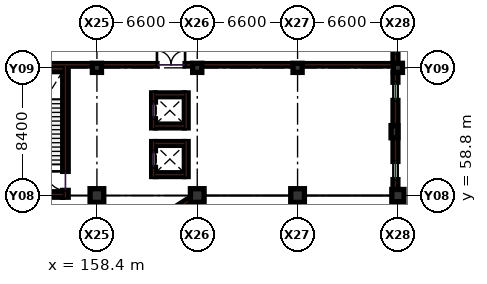
"""IFC4 building model, lengths in metres.
Left out: names, types, materials, properties, quantities, classifications, styles, units other than length and angle.
Written with IfcOpenShell. Run it as: python <this file> out.ifc"""

import sys

from ifc_helpers import new_model, si_unit, direction, frame, frame_2d, origin, origin_2d, place, context, subcontext, project, spatial, rectangle, extrude, element, fill, save


model = new_model("IFC4")
c1 = context("Model", 3, precision=1e-05, world=origin(), true_north=direction((0.0, 1.0)))
c2 = subcontext(c1, "Body", "Model", "MODEL_VIEW")
j1 = project(units=[si_unit("LENGTHUNIT", "METRE"), si_unit("PLANEANGLEUNIT", "RADIAN")], contexts=[c1])
p1 = place(None, origin())
s1 = spatial("IfcSite", under=j1, at=p1, CompositionType="ELEMENT")
p2 = place(p1, origin())
s2 = spatial("IfcBuilding", under=s1, at=p2, CompositionType="ELEMENT")
p3 = place(p2, origin())
s3 = spatial("IfcBuildingStorey", under=s2, at=p3, CompositionType="ELEMENT", Elevation=0.0)
p4 = place(p3, frame((158.4, 58.8, 0.0), z_axis=(0.0, 0.0, 1.0), x_axis=(1.0, 0.0, 0.0)))
e1 = element("IfcColumn", 1, at=p4, inside=s3, PredefinedType="COLUMN", context=c2, shape_type="SweptSolid", body=[
    extrude(rectangle(XDim=0.9, YDim=0.9, at=origin_2d()), origin(), (0.0, 0.0, 1.0), 5.4),
])
p5 = place(p3, frame((158.4, 67.2, 0.0), z_axis=(0.0, 0.0, 1.0), x_axis=(1.0, 0.0, 0.0)))
e2 = element("IfcColumn", 2, at=p5, inside=s3, PredefinedType="COLUMN", context=c2, shape_type="SweptSolid", body=[
    extrude(rectangle(XDim=0.6, YDim=0.6, at=origin_2d()), origin(), (0.0, 0.0, 1.0), 5.4),
])
p6 = place(p3, frame((165.0, 58.8, 0.0), z_axis=(0.0, 0.0, 1.0), x_axis=(1.0, 0.0, 0.0)))
e3 = element("IfcColumn", 3, at=p6, inside=s3, PredefinedType="COLUMN", context=c2, shape_type="SweptSolid", body=[
    extrude(rectangle(XDim=0.9, YDim=0.9, at=origin_2d()), origin(), (0.0, 0.0, 1.0), 5.4),
])
p7 = place(p3, frame((165.0, 67.2, 0.0), z_axis=(0.0, 0.0, 1.0), x_axis=(1.0, 0.0, 0.0)))
e4 = element("IfcColumn", 4, at=p7, inside=s3, PredefinedType="COLUMN", context=c2, shape_type="SweptSolid", body=[
    extrude(rectangle(XDim=0.6, YDim=0.6, at=origin_2d()), origin(), (0.0, 0.0, 1.0), 5.4),
])
p8 = place(p3, frame((171.6, 58.8, 0.0), z_axis=(0.0, 0.0, 1.0), x_axis=(1.0, 0.0, 0.0)))
e5 = element("IfcColumn", 5, at=p8, inside=s3, PredefinedType="COLUMN", context=c2, shape_type="SweptSolid", body=[
    extrude(rectangle(XDim=0.9, YDim=0.9, at=origin_2d()), origin(), (0.0, 0.0, 1.0), 5.4),
])
p9 = place(p3, frame((171.6, 67.2, 0.0), z_axis=(0.0, 0.0, 1.0), x_axis=(1.0, 0.0, 0.0)))
e6 = element("IfcColumn", 6, at=p9, inside=s3, PredefinedType="COLUMN", context=c2, shape_type="SweptSolid", body=[
    extrude(rectangle(XDim=0.6, YDim=0.6, at=origin_2d()), origin(), (0.0, 0.0, 1.0), 5.4),
])
p10 = place(p3, frame((178.2, 58.8, 0.0), z_axis=(0.0, 0.0, 1.0), x_axis=(1.0, 0.0, 0.0)))
e7 = element("IfcColumn", 7, at=p10, inside=s3, PredefinedType="COLUMN", context=c2, shape_type="SweptSolid", body=[
    extrude(rectangle(XDim=0.8, YDim=0.8, at=origin_2d()), origin(), (0.0, 0.0, 1.0), 5.4),
])
p11 = place(p3, frame((178.2, 67.2, 0.0), z_axis=(0.0, 0.0, 1.0), x_axis=(1.0, 0.0, 0.0)))
e8 = element("IfcColumn", 8, at=p11, inside=s3, PredefinedType="COLUMN", context=c2, shape_type="SweptSolid", body=[
    extrude(rectangle(XDim=0.6, YDim=0.6, at=origin_2d()), origin(), (0.0, 0.0, 1.0), 5.4),
])
p12 = place(p3, frame((177.975, 63.0, 0.0), z_axis=(0.0, 0.0, 1.0), x_axis=(1.0, 0.0, 0.0)))
e9 = element("IfcColumn", 9, at=p12, inside=s3, PredefinedType="PILASTER", context=c2, shape_type="SweptSolid", body=[
    extrude(rectangle(XDim=0.45, YDim=0.8, at=origin_2d()), origin(), (0.0, 0.0, 1.0), 5.4),
])
p13 = place(p3, frame((152.0, 67.4, 0.0), z_axis=(0.0, 0.0, 1.0), x_axis=(1.0, 0.0, 0.0)))
e10 = element("IfcWall", 10, at=p13, inside=s3, PredefinedType="PARTITIONING", context=c2, shape_type="SweptSolid", body=[
    extrude(rectangle(XDim=5.95, YDim=0.16, at=frame_2d((2.975, 0.0))), origin(), (0.0, 0.0, 1.0), 4.25),
])
p14 = place(p3, frame((158.85, 67.4, 0.0), z_axis=(0.0, 0.0, 1.0), x_axis=(1.0, 0.0, 0.0)))
e11 = element("IfcWall", 11, at=p14, inside=s3, PredefinedType="PARTITIONING", context=c2, shape_type="SweptSolid", body=[
    extrude(rectangle(XDim=5.7, YDim=0.16, at=frame_2d((2.85, 0.0))), origin(), (0.0, 0.0, 1.0), 4.235),
])
p15 = place(p14, frame((3.5, 0.0, 0.0)))
e12 = element("IfcOpeningElement", 12, at=p15, cuts=e11, PredefinedType="OPENING", context=c2, shape_type="SweptSolid", body=[
    extrude(rectangle(XDim=1.85, YDim=2.25, at=frame_2d((0.925, 1.125))), frame((0.0, 0.09, 0.0), z_axis=(0.0, -1.0, 0.0), x_axis=(1.0, 0.0, 0.0)), (0.0, 0.0, 1.0), 0.18),
])
p16 = place(p3, frame((165.45, 67.4, 0.0), z_axis=(0.0, 0.0, 1.0), x_axis=(1.0, 0.0, 0.0)))
e13 = element("IfcWall", 13, at=p16, inside=s3, PredefinedType="PARTITIONING", context=c2, shape_type="SweptSolid", body=[
    extrude(rectangle(XDim=5.7, YDim=0.16, at=frame_2d((2.85, 0.0))), origin(), (0.0, 0.0, 1.0), 4.235),
])
p17 = place(p3, frame((172.05, 67.4, 0.0), z_axis=(0.0, 0.0, 1.0), x_axis=(1.0, 0.0, 0.0)))
e14 = element("IfcWall", 14, at=p17, inside=s3, PredefinedType="PARTITIONING", context=c2, shape_type="SweptSolid", body=[
    extrude(rectangle(XDim=5.83, YDim=0.16, at=frame_2d((2.915, 0.0))), origin(), (0.0, 0.0, 1.0), 4.235),
])
p18 = place(p3, frame((165.3, 50.85, 0.0), z_axis=(0.0, 0.0, 1.0), x_axis=(0.0, 1.0, 0.0)))
e15 = element("IfcWall", 15, at=p18, inside=s3, PredefinedType="PARTITIONING", context=c2, shape_type="SweptSolid", body=[
    extrude(rectangle(XDim=7.65, YDim=0.16, at=frame_2d((3.825, 0.0))), origin(), (0.0, 0.0, 1.0), 4.25),
])
p19 = place(p18, frame((4.4, 0.0, 0.0)))
e16 = element("IfcOpeningElement", 16, at=p19, cuts=e15, PredefinedType="OPENING", context=c2, shape_type="SweptSolid", body=[
    extrude(rectangle(XDim=1.6, YDim=2.2, at=frame_2d((0.8, 1.1))), frame((0.0, 0.09, 0.0), z_axis=(0.0, -1.0, 0.0), x_axis=(1.0, 0.0, 0.0)), (0.0, 0.0, 1.0), 0.18),
])
p20 = place(p3, frame((178.04, 50.795, 0.0), z_axis=(0.0, 0.0, 1.0), x_axis=(0.0, 1.0, 0.0)))
e17 = element("IfcWall", 17, at=p20, inside=s3, PredefinedType="SOLIDWALL", context=c2, shape_type="SweptSolid", body=[
    extrude(rectangle(XDim=7.61, YDim=0.32, at=frame_2d((3.805, 0.0))), origin(), (0.0, 0.0, 1.0), 4.335),
])
p21 = place(p20, frame((2.905, 0.0, 0.0)))
e18 = element("IfcOpeningElement", 18, at=p21, cuts=e17, PredefinedType="OPENING", context=c2, shape_type="SweptSolid", body=[
    extrude(rectangle(XDim=1.8, YDim=2.2, at=frame_2d((0.9, 1.1))), frame((0.0, 0.17, 0.0), z_axis=(0.0, -1.0, 0.0), x_axis=(1.0, 0.0, 0.0)), (0.0, 0.0, 1.0), 0.34),
])
p22 = place(p3, frame((178.04, 59.195, 0.0), z_axis=(0.0, 0.0, 1.0), x_axis=(0.0, 1.0, 0.0)))
e19 = element("IfcWall", 19, at=p22, inside=s3, PredefinedType="SOLIDWALL", context=c2, shape_type="SweptSolid", body=[
    extrude(rectangle(XDim=7.71, YDim=0.32, at=frame_2d((3.855, 0.0))), origin(), (0.0, 0.0, 1.0), 4.335),
])
p23 = place(p22, frame((0.65, 0.0, 0.95)))
e20 = element("IfcOpeningElement", 20, at=p23, cuts=e19, PredefinedType="OPENING", context=c2, shape_type="SweptSolid", body=[
    extrude(rectangle(XDim=1.2, YDim=1.5, at=frame_2d((0.6, 0.75))), frame((0.0, 0.17, 0.0), z_axis=(0.0, -1.0, 0.0), x_axis=(1.0, 0.0, 0.0)), (0.0, 0.0, 1.0), 0.34),
])
p24 = place(p22, frame((5.86, 0.0, 0.95)))
e21 = element("IfcOpeningElement", 21, at=p24, cuts=e19, PredefinedType="OPENING", context=c2, shape_type="SweptSolid", body=[
    extrude(rectangle(XDim=1.2, YDim=1.5, at=frame_2d((0.6, 0.75))), frame((0.0, 0.17, 0.0), z_axis=(0.0, -1.0, 0.0), x_axis=(1.0, 0.0, 0.0)), (0.0, 0.0, 1.0), 0.34),
])
p25 = place(p3, frame((178.04, 67.495, 0.0), z_axis=(0.0, 0.0, 1.0), x_axis=(0.0, 1.0, 0.0)))
e22 = element("IfcWall", 22, at=p25, inside=s3, PredefinedType="SOLIDWALL", context=c2, shape_type="SweptSolid", body=[
    extrude(rectangle(XDim=7.81, YDim=0.32, at=frame_2d((3.905, 0.0))), origin(), (0.0, 0.0, 1.0), 4.335),
])
p26 = place(p25, frame((0.65, 0.0, 0.95)))
e23 = element("IfcOpeningElement", 23, at=p26, cuts=e22, PredefinedType="OPENING", context=c2, shape_type="SweptSolid", body=[
    extrude(rectangle(XDim=1.2, YDim=1.5, at=frame_2d((0.6, 0.75))), frame((0.0, 0.17, 0.0), z_axis=(0.0, -1.0, 0.0), x_axis=(1.0, 0.0, 0.0)), (0.0, 0.0, 1.0), 0.34),
])
p27 = place(p25, frame((5.96, 0.0, 0.95)))
e24 = element("IfcOpeningElement", 24, at=p27, cuts=e22, PredefinedType="OPENING", context=c2, shape_type="SweptSolid", body=[
    extrude(rectangle(XDim=1.2, YDim=1.5, at=frame_2d((0.6, 0.75))), frame((0.0, 0.17, 0.0), z_axis=(0.0, -1.0, 0.0), x_axis=(1.0, 0.0, 0.0)), (0.0, 0.0, 1.0), 0.34),
])
p28 = place(p3, frame((158.65, 54.76, 0.0), z_axis=(0.0, 0.0, 1.0), x_axis=(0.843786613851, 0.536678814829, 0.0)))
e25 = element("IfcWall", 25, at=p28, inside=s3, PredefinedType="SOLIDWALL", context=c2, shape_type="SweptSolid", body=[
    extrude(rectangle(XDim=7.229, YDim=0.32, at=frame_2d((3.615, 0.0))), origin(), (0.0, 0.0, 1.0), 4.485),
])
p29 = place(p28, frame((2.415, 0.0, 0.95)))
e26 = element("IfcOpeningElement", 26, at=p29, cuts=e25, PredefinedType="OPENING", context=c2, shape_type="SweptSolid", body=[
    extrude(rectangle(XDim=2.4, YDim=1.6, at=frame_2d((1.2, 0.8))), frame((0.0, 0.17, 0.0), z_axis=(0.0, -1.0, 0.0), x_axis=(1.0, 0.0, 0.0)), (0.0, 0.0, 1.0), 0.34),
])
p30 = place(p3, frame((156.33, 58.69, 0.0), z_axis=(0.0, 0.0, 1.0), x_axis=(0.0, 1.0, 0.0)))
e27 = element("IfcWall", 27, at=p30, inside=s3, PredefinedType="SHEAR", context=c2, shape_type="SweptSolid", body=[
    extrude(rectangle(XDim=8.62, YDim=0.36, at=frame_2d((4.31, 0.0))), origin(), (0.0, 0.0, 1.0), 5.1),
])
p31 = place(p30, frame((0.45, 0.0, 0.0)))
e28 = element("IfcOpeningElement", 28, at=p31, cuts=e27, PredefinedType="OPENING", context=c2, shape_type="SweptSolid", body=[
    extrude(rectangle(XDim=1.25, YDim=2.15, at=frame_2d((0.625, 1.075))), frame((0.0, 0.19, 0.0), z_axis=(0.0, -1.0, 0.0), x_axis=(1.0, 0.0, 0.0)), (0.0, 0.0, 1.0), 0.38),
])
for number, where, z_axis, x_axis in (
    (29, (152.35, 67.13, 0.0), (0.0, 0.0, 1.0), (1.0, 0.0, 0.0)),
    (30, (152.35, 58.87, 0.0), (0.0, 0.0, 1.0), (1.0, 0.0, 0.0)),
):
    element("IfcWall", number, at=place(p3, frame(where, z_axis=z_axis, x_axis=x_axis)), inside=s3, PredefinedType="SHEAR", context=c2, shape_type="SweptSolid", body=[
        extrude(rectangle(XDim=3.8, YDim=0.36, at=frame_2d((1.9, 0.0))), origin(), (0.0, 0.0, 1.0), 5.1),
    ])
p32 = place(p3, frame((162.125, 60.05, 0.0), z_axis=(0.0, 0.0, 1.0), x_axis=(0.0, 1.0, 0.0)))
e31 = element("IfcWall", 31, at=p32, inside=s3, PredefinedType="SHEAR", context=c2, shape_type="SweptSolid", body=[
    extrude(rectangle(XDim=2.3, YDim=0.25, at=frame_2d((1.15, 0.0))), origin(), (0.0, 0.0, 1.0), 5.1),
])
p33 = place(p32, frame((0.6, 0.0, 0.0)))
e32 = element("IfcOpeningElement", 32, at=p33, cuts=e31, PredefinedType="OPENING", context=c2, shape_type="SweptSolid", body=[
    extrude(rectangle(XDim=1.1, YDim=2.15, at=frame_2d((0.55, 1.075))), frame((0.0, 0.135, 0.0), z_axis=(0.0, -1.0, 0.0), x_axis=(1.0, 0.0, 0.0)), (0.0, 0.0, 1.0), 0.27),
])
p34 = place(p3, frame((164.275, 60.05, 0.0), z_axis=(0.0, 0.0, 1.0), x_axis=(0.0, 1.0, 0.0)))
e33 = element("IfcWall", 33, at=p34, inside=s3, PredefinedType="SHEAR", context=c2, shape_type="SweptSolid", body=[
    extrude(rectangle(XDim=2.3, YDim=0.25, at=frame_2d((1.15, 0.0))), origin(), (0.0, 0.0, 1.0), 5.1),
])
for number, where, z_axis, x_axis in (
    (34, (162.25, 60.175, 0.0), (0.0, 0.0, 1.0), (1.0, 0.0, 0.0)),
    (35, (162.25, 62.225, 0.0), (0.0, 0.0, 1.0), (1.0, 0.0, 0.0)),
):
    element("IfcWall", number, at=place(p3, frame(where, z_axis=z_axis, x_axis=x_axis)), inside=s3, PredefinedType="SHEAR", context=c2, shape_type="SweptSolid", body=[
        extrude(rectangle(XDim=1.9, YDim=0.25, at=frame_2d((0.95, 0.0))), origin(), (0.0, 0.0, 1.0), 5.1),
    ])
p35 = place(p3, frame((162.125, 63.25, 0.0), z_axis=(0.0, 0.0, 1.0), x_axis=(0.0, 1.0, 0.0)))
e36 = element("IfcWall", 36, at=p35, inside=s3, PredefinedType="SHEAR", context=c2, shape_type="SweptSolid", body=[
    extrude(rectangle(XDim=2.3, YDim=0.25, at=frame_2d((1.15, 0.0))), origin(), (0.0, 0.0, 1.0), 5.1),
])
p36 = place(p35, frame((0.6, 0.0, 0.0)))
e37 = element("IfcOpeningElement", 37, at=p36, cuts=e36, PredefinedType="OPENING", context=c2, shape_type="SweptSolid", body=[
    extrude(rectangle(XDim=1.1, YDim=2.15, at=frame_2d((0.55, 1.075))), frame((0.0, 0.135, 0.0), z_axis=(0.0, -1.0, 0.0), x_axis=(1.0, 0.0, 0.0)), (0.0, 0.0, 1.0), 0.27),
])
p37 = place(p3, frame((164.275, 63.25, 0.0), z_axis=(0.0, 0.0, 1.0), x_axis=(0.0, 1.0, 0.0)))
e38 = element("IfcWall", 38, at=p37, inside=s3, PredefinedType="SHEAR", context=c2, shape_type="SweptSolid", body=[
    extrude(rectangle(XDim=2.3, YDim=0.25, at=frame_2d((1.15, 0.0))), origin(), (0.0, 0.0, 1.0), 5.1),
])
for number, where, z_axis, x_axis in (
    (39, (162.25, 63.375, 0.0), (0.0, 0.0, 1.0), (1.0, 0.0, 0.0)),
    (40, (162.25, 65.425, 0.0), (0.0, 0.0, 1.0), (1.0, 0.0, 0.0)),
):
    element("IfcWall", number, at=place(p3, frame(where, z_axis=z_axis, x_axis=x_axis)), inside=s3, PredefinedType="SHEAR", context=c2, shape_type="SweptSolid", body=[
        extrude(rectangle(XDim=1.9, YDim=0.25, at=frame_2d((0.95, 0.0))), origin(), (0.0, 0.0, 1.0), 5.1),
    ])
p38 = place(p15, origin())
e41 = element("IfcDoor", 41, at=p38, inside=s3, OperationType="DOUBLE_DOOR_SINGLE_SWING", PredefinedType="DOOR", context=c2, shape_type="SweptSolid", body=[
    extrude(rectangle(XDim=1.85, YDim=2.25, at=frame_2d((0.925, 1.125))), frame((0.0, 0.025, 0.0), z_axis=(0.0, -1.0, 0.0), x_axis=(1.0, 0.0, 0.0)), (0.0, 0.0, 1.0), 0.05),
])
fill(e12, e41)
p39 = place(p23, origin())
e42 = element("IfcWindow", 42, at=p39, inside=s3, PartitioningType="SINGLE_PANEL", PredefinedType="WINDOW", context=c2, shape_type="SweptSolid", body=[
    extrude(rectangle(XDim=1.2, YDim=1.5, at=frame_2d((0.6, 0.75))), frame((0.0, 0.03, 0.0), z_axis=(0.0, -1.0, 0.0), x_axis=(1.0, 0.0, 0.0)), (0.0, 0.0, 1.0), 0.06),
])
fill(e20, e42)
p40 = place(p24, origin())
e43 = element("IfcWindow", 43, at=p40, inside=s3, PartitioningType="SINGLE_PANEL", PredefinedType="WINDOW", context=c2, shape_type="SweptSolid", body=[
    extrude(rectangle(XDim=1.2, YDim=1.5, at=frame_2d((0.6, 0.75))), frame((0.0, 0.03, 0.0), z_axis=(0.0, -1.0, 0.0), x_axis=(1.0, 0.0, 0.0)), (0.0, 0.0, 1.0), 0.06),
])
fill(e21, e43)
p41 = place(p26, origin())
e44 = element("IfcWindow", 44, at=p41, inside=s3, PartitioningType="SINGLE_PANEL", PredefinedType="WINDOW", context=c2, shape_type="SweptSolid", body=[
    extrude(rectangle(XDim=1.2, YDim=1.5, at=frame_2d((0.6, 0.75))), frame((0.0, 0.03, 0.0), z_axis=(0.0, -1.0, 0.0), x_axis=(1.0, 0.0, 0.0)), (0.0, 0.0, 1.0), 0.06),
])
fill(e23, e44)
p42 = place(p31, origin())
e45 = element("IfcDoor", 45, at=p42, inside=s3, OperationType="SINGLE_SWING_RIGHT", PredefinedType="DOOR", context=c2, shape_type="SweptSolid", body=[
    extrude(rectangle(XDim=1.25, YDim=2.15, at=frame_2d((0.625, 1.075))), frame((0.0, 0.025, 0.0), z_axis=(0.0, -1.0, 0.0), x_axis=(1.0, 0.0, 0.0)), (0.0, 0.0, 1.0), 0.05),
])
fill(e28, e45)
p43 = place(p33, origin())
e46 = element("IfcDoor", 46, at=p43, inside=s3, OperationType="SLIDING_TO_LEFT", PredefinedType="DOOR", context=c2, shape_type="SweptSolid", body=[
    extrude(rectangle(XDim=1.1, YDim=2.15, at=frame_2d((0.55, 1.075))), frame((0.0, 0.025, 0.0), z_axis=(0.0, -1.0, 0.0), x_axis=(1.0, 0.0, 0.0)), (0.0, 0.0, 1.0), 0.05),
])
fill(e32, e46)
p44 = place(p36, origin())
e47 = element("IfcDoor", 47, at=p44, inside=s3, OperationType="SLIDING_TO_LEFT", PredefinedType="DOOR", context=c2, shape_type="SweptSolid", body=[
    extrude(rectangle(XDim=1.1, YDim=2.15, at=frame_2d((0.55, 1.075))), frame((0.0, 0.025, 0.0), z_axis=(0.0, -1.0, 0.0), x_axis=(1.0, 0.0, 0.0)), (0.0, 0.0, 1.0), 0.05),
])
fill(e37, e47)
save(model, sys.argv[1])
